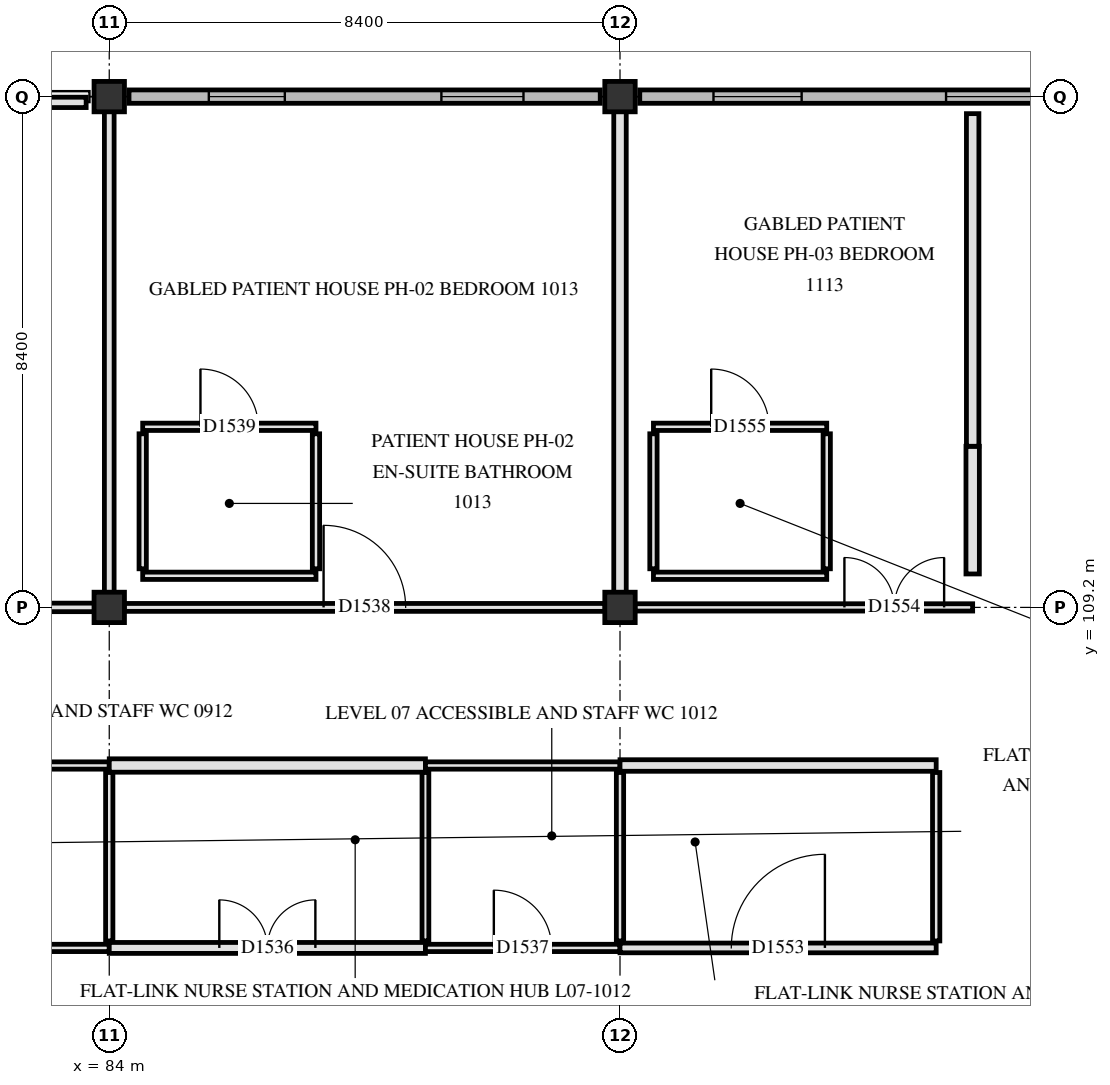
"""IFC4 building model, lengths in metres.
Left out: names, types, materials, properties, quantities, classifications, styles, units other than length and angle.
Written with IfcOpenShell. Run it as: python <this file> out.ifc"""

import sys

from ifc_helpers import new_model, si_unit, direction, frame, frame_2d, origin, origin_2d, place, context, subcontext, project, spatial, polyline, rectangle, outline, extrude, element, fill, save


model = new_model("IFC4")
c1 = context("Model", 3, precision=1e-05, world=origin(), true_north=direction((0.0, 1.0)))
c2 = subcontext(c1, "Body", "Model", "MODEL_VIEW")
j1 = project(units=[si_unit("LENGTHUNIT", "METRE"), si_unit("PLANEANGLEUNIT", "RADIAN")], contexts=[c1])
p1 = place(None, origin())
s1 = spatial("IfcSite", under=j1, at=p1, CompositionType="ELEMENT")
p2 = place(p1, origin())
s2 = spatial("IfcBuilding", under=s1, at=p2, CompositionType="ELEMENT")
p3 = place(p2, frame((0.0, 0.0, 30.3)))
s3 = spatial("IfcBuildingStorey", under=s2, at=p3, CompositionType="ELEMENT", Elevation=30.3)
for number, where, z_axis, x_axis in (
    (1, (84.0, 109.2, 0.0), (0.0, 0.0, 1.0), (1.0, 0.0, 0.0)),
    (2, (84.0, 117.6, 0.0), (0.0, 0.0, 1.0), (1.0, 0.0, 0.0)),
    (3, (92.4, 109.2, 0.0), (0.0, 0.0, 1.0), (1.0, 0.0, 0.0)),
    (4, (92.4, 117.6, 0.0), (0.0, 0.0, 1.0), (1.0, 0.0, 0.0)),
):
    element("IfcColumn", number, at=place(p3, frame(where, z_axis=z_axis, x_axis=x_axis)), inside=s3, PredefinedType="COLUMN", context=c2, shape_type="SweptSolid", body=[
        extrude(rectangle(XDim=0.5, YDim=0.5, at=origin_2d()), origin(), (0.0, 0.0, 1.0), 3.9),
    ])
p4 = place(p3, frame((84.325, 117.6, 0.0), z_axis=(0.0, 0.0, 1.0), x_axis=(1.0, 0.0, 0.0)))
e5 = element("IfcWall", 5, at=p4, inside=s3, PredefinedType="SOLIDWALL", context=c2, shape_type="SweptSolid", body=[
    extrude(outline(polyline([(0.0, 0.0), (7.75, 0.0), (7.75, 3.4), (3.875, 5.76), (0.0, 3.4), (0.0, 0.0)])), frame((0.0, 0.11, 0.0), z_axis=(0.0, -1.0, 0.0), x_axis=(1.0, 0.0, 0.0)), (0.0, 0.0, 1.0), 0.22),
])
p5 = place(p4, frame((1.312, 0.0, 0.85)))
e6 = element("IfcOpeningElement", 6, at=p5, cuts=e5, PredefinedType="OPENING", context=c2, shape_type="SweptSolid", body=[
    extrude(rectangle(XDim=1.25, YDim=1.54, at=frame_2d((0.625, 0.77))), frame((0.0, 0.12, 0.0), z_axis=(0.0, -1.0, 0.0), x_axis=(1.0, 0.0, 0.0)), (0.0, 0.0, 1.0), 0.24),
])
p6 = place(p4, frame((5.137, 0.0, 0.85)))
e7 = element("IfcOpeningElement", 7, at=p6, cuts=e5, PredefinedType="OPENING", context=c2, shape_type="SweptSolid", body=[
    extrude(rectangle(XDim=1.35, YDim=1.54, at=frame_2d((0.675, 0.77))), frame((0.0, 0.12, 0.0), z_axis=(0.0, -1.0, 0.0), x_axis=(1.0, 0.0, 0.0)), (0.0, 0.0, 1.0), 0.24),
])
p7 = place(p3, frame((92.725, 117.6, 0.0), z_axis=(0.0, 0.0, 1.0), x_axis=(1.0, 0.0, 0.0)))
e8 = element("IfcWall", 8, at=p7, inside=s3, PredefinedType="SOLIDWALL", context=c2, shape_type="SweptSolid", body=[
    extrude(outline(polyline([(0.0, 0.0), (7.75, 0.0), (7.75, 3.4), (3.875, 5.76), (0.0, 3.4), (0.0, 0.0)])), frame((0.0, 0.11, 0.0), z_axis=(0.0, -1.0, 0.0), x_axis=(1.0, 0.0, 0.0)), (0.0, 0.0, 1.0), 0.22),
])
p8 = place(p7, frame((1.212, 0.0, 0.85)))
e9 = element("IfcOpeningElement", 9, at=p8, cuts=e8, PredefinedType="OPENING", context=c2, shape_type="SweptSolid", body=[
    extrude(rectangle(XDim=1.45, YDim=1.54, at=frame_2d((0.725, 0.77))), frame((0.0, 0.12, 0.0), z_axis=(0.0, -1.0, 0.0), x_axis=(1.0, 0.0, 0.0)), (0.0, 0.0, 1.0), 0.24),
])
p9 = place(p7, frame((5.038, 0.0, 0.85)))
e10 = element("IfcOpeningElement", 10, at=p9, cuts=e8, PredefinedType="OPENING", context=c2, shape_type="SweptSolid", body=[
    extrude(rectangle(XDim=1.55, YDim=1.54, at=frame_2d((0.775, 0.77))), frame((0.0, 0.12, 0.0), z_axis=(0.0, -1.0, 0.0), x_axis=(1.0, 0.0, 0.0)), (0.0, 0.0, 1.0), 0.24),
])
p10 = place(p3, frame((75.98, 117.505, 3.88), z_axis=(0.0, 0.0, 1.0), x_axis=(1.0, 0.0, 0.0)))
e11 = element("IfcWall", 11, at=p10, inside=s3, PredefinedType="PARAPET", context=c2, shape_type="SweptSolid", body=[
    extrude(rectangle(XDim=7.64, YDim=0.17, at=frame_2d((3.82, 0.0))), origin(), (0.0, 0.0, 1.0), 0.47),
])
p11 = place(p3, frame((80.8, 103.6, 0.0), z_axis=(0.0, 0.0, 1.0), x_axis=(1.0, 0.0, 0.0)))
e12 = element("IfcWall", 12, at=p11, inside=s3, PredefinedType="PARTITIONING", context=c2, shape_type="SweptSolid", body=[
    extrude(rectangle(XDim=3.2, YDim=0.12, at=frame_2d((1.6, 0.0))), origin(), (0.0, 0.0, 1.0), 3.25),
])
p12 = place(p11, frame((1.125, 0.0, 0.0)))
e13 = element("IfcOpeningElement", 13, at=p12, cuts=e12, PredefinedType="OPENING", context=c2, shape_type="SweptSolid", body=[
    extrude(rectangle(XDim=0.95, YDim=2.1, at=frame_2d((0.475, 1.05))), frame((0.0, 0.07, 0.0), z_axis=(0.0, -1.0, 0.0), x_axis=(1.0, 0.0, 0.0)), (0.0, 0.0, 1.0), 0.14),
])
p13 = place(p3, frame((84.0, 103.6, 0.0), z_axis=(0.0, 0.0, 1.0), x_axis=(1.0, 0.0, 0.0)))
e14 = element("IfcWall", 14, at=p13, inside=s3, PredefinedType="PARTITIONING", context=c2, shape_type="SweptSolid", body=[
    extrude(rectangle(XDim=5.2, YDim=0.18, at=frame_2d((2.6, 0.0))), origin(), (0.0, 0.0, 1.0), 3.25),
])
p14 = place(p13, frame((1.81, 0.0, 0.0)))
e15 = element("IfcOpeningElement", 15, at=p14, cuts=e14, PredefinedType="OPENING", context=c2, shape_type="SweptSolid", body=[
    extrude(rectangle(XDim=1.58, YDim=2.22, at=frame_2d((0.79, 1.11))), frame((0.0, 0.1, 0.0), z_axis=(0.0, -1.0, 0.0), x_axis=(1.0, 0.0, 0.0)), (0.0, 0.0, 1.0), 0.2),
])
p15 = place(p3, frame((89.2, 103.6, 0.0), z_axis=(0.0, 0.0, 1.0), x_axis=(1.0, 0.0, 0.0)))
e16 = element("IfcWall", 16, at=p15, inside=s3, PredefinedType="PARTITIONING", context=c2, shape_type="SweptSolid", body=[
    extrude(rectangle(XDim=3.2, YDim=0.12, at=frame_2d((1.6, 0.0))), origin(), (0.0, 0.0, 1.0), 3.25),
])
p16 = place(p15, frame((1.125, 0.0, 0.0)))
e17 = element("IfcOpeningElement", 17, at=p16, cuts=e16, PredefinedType="OPENING", context=c2, shape_type="SweptSolid", body=[
    extrude(rectangle(XDim=0.95, YDim=2.1, at=frame_2d((0.475, 1.05))), frame((0.0, 0.07, 0.0), z_axis=(0.0, -1.0, 0.0), x_axis=(1.0, 0.0, 0.0)), (0.0, 0.0, 1.0), 0.14),
])
p17 = place(p3, frame((92.4, 103.6, 0.0), z_axis=(0.0, 0.0, 1.0), x_axis=(1.0, 0.0, 0.0)))
e18 = element("IfcWall", 18, at=p17, inside=s3, PredefinedType="PARTITIONING", context=c2, shape_type="SweptSolid", body=[
    extrude(rectangle(XDim=5.2, YDim=0.16, at=frame_2d((2.6, 0.0))), origin(), (0.0, 0.0, 1.0), 3.25),
])
p18 = place(p17, frame((1.83, 0.0, 0.0)))
e19 = element("IfcOpeningElement", 19, at=p18, cuts=e18, PredefinedType="OPENING", context=c2, shape_type="SweptSolid", body=[
    extrude(rectangle(XDim=1.54, YDim=2.24, at=frame_2d((0.77, 1.12))), frame((0.0, 0.09, 0.0), z_axis=(0.0, -1.0, 0.0), x_axis=(1.0, 0.0, 0.0)), (0.0, 0.0, 1.0), 0.18),
])
p19 = place(p3, frame((80.8, 106.6, 0.0), z_axis=(0.0, 0.0, 1.0), x_axis=(1.0, 0.0, 0.0)))
e20 = element("IfcWall", 20, at=p19, inside=s3, PredefinedType="PARTITIONING", context=c2, shape_type="SweptSolid", body=[
    extrude(rectangle(XDim=3.2, YDim=0.12, at=frame_2d((1.6, 0.0))), origin(), (0.0, 0.0, 1.0), 3.25),
])
p20 = place(p3, frame((84.0, 106.6, 0.0), z_axis=(0.0, 0.0, 1.0), x_axis=(1.0, 0.0, 0.0)))
e21 = element("IfcWall", 21, at=p20, inside=s3, PredefinedType="PARTITIONING", context=c2, shape_type="SweptSolid", body=[
    extrude(rectangle(XDim=5.2, YDim=0.22, at=frame_2d((2.6, 0.0))), origin(), (0.0, 0.0, 1.0), 3.25),
])
p21 = place(p3, frame((89.2, 106.6, 0.0), z_axis=(0.0, 0.0, 1.0), x_axis=(1.0, 0.0, 0.0)))
e22 = element("IfcWall", 22, at=p21, inside=s3, PredefinedType="PARTITIONING", context=c2, shape_type="SweptSolid", body=[
    extrude(rectangle(XDim=3.2, YDim=0.12, at=frame_2d((1.6, 0.0))), origin(), (0.0, 0.0, 1.0), 3.25),
])
p22 = place(p3, frame((92.4, 106.6, 0.0), z_axis=(0.0, 0.0, 1.0), x_axis=(1.0, 0.0, 0.0)))
e23 = element("IfcWall", 23, at=p22, inside=s3, PredefinedType="PARTITIONING", context=c2, shape_type="SweptSolid", body=[
    extrude(rectangle(XDim=5.2, YDim=0.19, at=frame_2d((2.6, 0.0))), origin(), (0.0, 0.0, 1.0), 3.25),
])
p23 = place(p3, frame((75.845, 109.2, 0.0), z_axis=(0.0, 0.0, 1.0), x_axis=(1.0, 0.0, 0.0)))
e24 = element("IfcWall", 24, at=p23, inside=s3, PredefinedType="PARTITIONING", context=c2, shape_type="SweptSolid", body=[
    extrude(rectangle(XDim=7.91, YDim=0.14, at=frame_2d((3.955, 0.0))), origin(), (0.0, 0.0, 1.0), 3.25),
])
p24 = place(p23, frame((3.315, 0.0, 0.0)))
e25 = element("IfcOpeningElement", 25, at=p24, cuts=e24, PredefinedType="OPENING", context=c2, shape_type="SweptSolid", body=[
    extrude(rectangle(XDim=1.28, YDim=2.18, at=frame_2d((0.64, 1.09))), frame((0.0, 0.08, 0.0), z_axis=(0.0, -1.0, 0.0), x_axis=(1.0, 0.0, 0.0)), (0.0, 0.0, 1.0), 0.16),
])
p25 = place(p3, frame((84.245, 109.2, 0.0), z_axis=(0.0, 0.0, 1.0), x_axis=(1.0, 0.0, 0.0)))
e26 = element("IfcWall", 26, at=p25, inside=s3, PredefinedType="PARTITIONING", context=c2, shape_type="SweptSolid", body=[
    extrude(rectangle(XDim=7.91, YDim=0.13, at=frame_2d((3.955, 0.0))), origin(), (0.0, 0.0, 1.0), 3.25),
])
p26 = place(p25, frame((3.28, 0.0, 0.0)))
e27 = element("IfcOpeningElement", 27, at=p26, cuts=e26, PredefinedType="OPENING", context=c2, shape_type="SweptSolid", body=[
    extrude(rectangle(XDim=1.35, YDim=2.2, at=frame_2d((0.675, 1.1))), frame((0.0, 0.075, 0.0), z_axis=(0.0, -1.0, 0.0), x_axis=(1.0, 0.0, 0.0)), (0.0, 0.0, 1.0), 0.15),
])
p27 = place(p3, frame((92.645, 109.2, 0.0), z_axis=(0.0, 0.0, 1.0), x_axis=(1.0, 0.0, 0.0)))
e28 = element("IfcWall", 28, at=p27, inside=s3, PredefinedType="PARTITIONING", context=c2, shape_type="SweptSolid", body=[
    extrude(rectangle(XDim=5.555, YDim=0.12, at=frame_2d((2.777, 0.0))), origin(), (0.0, 0.0, 1.0), 3.25),
])
p28 = place(p27, frame((3.446, 0.0, 0.0)))
e29 = element("IfcOpeningElement", 29, at=p28, cuts=e28, PredefinedType="OPENING", context=c2, shape_type="SweptSolid", body=[
    extrude(rectangle(XDim=1.64, YDim=2.28, at=frame_2d((0.82, 1.14))), frame((0.0, 0.07, 0.0), z_axis=(0.0, -1.0, 0.0), x_axis=(1.0, 0.0, 0.0)), (0.0, 0.0, 1.0), 0.14),
])
p29 = place(p3, frame((84.55, 109.72, 0.0), z_axis=(0.0, 0.0, 1.0), x_axis=(1.0, 0.0, 0.0)))
e30 = element("IfcWall", 30, at=p29, inside=s3, PredefinedType="PARTITIONING", context=c2, shape_type="SweptSolid", body=[
    extrude(rectangle(XDim=2.85, YDim=0.12, at=frame_2d((1.425, 0.0))), origin(), (0.0, 0.0, 1.0), 3.65),
])
p30 = place(p3, frame((92.95, 109.72, 0.0), z_axis=(0.0, 0.0, 1.0), x_axis=(1.0, 0.0, 0.0)))
e31 = element("IfcWall", 31, at=p30, inside=s3, PredefinedType="PARTITIONING", context=c2, shape_type="SweptSolid", body=[
    extrude(rectangle(XDim=2.85, YDim=0.12, at=frame_2d((1.425, 0.0))), origin(), (0.0, 0.0, 1.0), 3.65),
])
p31 = place(p3, frame((84.55, 112.17, 0.0), z_axis=(0.0, 0.0, 1.0), x_axis=(1.0, 0.0, 0.0)))
e32 = element("IfcWall", 32, at=p31, inside=s3, PredefinedType="PARTITIONING", context=c2, shape_type="SweptSolid", body=[
    extrude(rectangle(XDim=2.85, YDim=0.12, at=frame_2d((1.425, 0.0))), origin(), (0.0, 0.0, 1.0), 3.65),
])
p32 = place(p31, frame((0.95, 0.0, 0.0)))
e33 = element("IfcOpeningElement", 33, at=p32, cuts=e32, PredefinedType="OPENING", context=c2, shape_type="SweptSolid", body=[
    extrude(rectangle(XDim=0.95, YDim=2.1, at=frame_2d((0.475, 1.05))), frame((0.0, 0.07, 0.0), z_axis=(0.0, -1.0, 0.0), x_axis=(1.0, 0.0, 0.0)), (0.0, 0.0, 1.0), 0.14),
])
p33 = place(p3, frame((92.95, 112.17, 0.0), z_axis=(0.0, 0.0, 1.0), x_axis=(1.0, 0.0, 0.0)))
e34 = element("IfcWall", 34, at=p33, inside=s3, PredefinedType="PARTITIONING", context=c2, shape_type="SweptSolid", body=[
    extrude(rectangle(XDim=2.85, YDim=0.12, at=frame_2d((1.425, 0.0))), origin(), (0.0, 0.0, 1.0), 3.65),
])
p34 = place(p33, frame((0.95, 0.0, 0.0)))
e35 = element("IfcOpeningElement", 35, at=p34, cuts=e34, PredefinedType="OPENING", context=c2, shape_type="SweptSolid", body=[
    extrude(rectangle(XDim=0.95, YDim=2.1, at=frame_2d((0.475, 1.05))), frame((0.0, 0.07, 0.0), z_axis=(0.0, -1.0, 0.0), x_axis=(1.0, 0.0, 0.0)), (0.0, 0.0, 1.0), 0.14),
])
p35 = place(p3, frame((84.0, 103.715, 0.0), z_axis=(0.0, 0.0, 1.0), x_axis=(0.0, 1.0, 0.0)))
e36 = element("IfcWall", 36, at=p35, inside=s3, PredefinedType="PARTITIONING", context=c2, shape_type="SweptSolid", body=[
    extrude(rectangle(XDim=2.77, YDim=0.12, at=frame_2d((1.385, 0.0))), origin(), (0.0, 0.0, 1.0), 3.25),
])
p36 = place(p3, frame((84.0, 109.445, 0.0), z_axis=(0.0, 0.0, 1.0), x_axis=(0.0, 1.0, 0.0)))
e37 = element("IfcWall", 37, at=p36, inside=s3, PredefinedType="PARTITIONING", context=c2, shape_type="SweptSolid", body=[
    extrude(rectangle(XDim=7.91, YDim=0.16, at=frame_2d((3.955, 0.0))), origin(), (0.0, 0.0, 1.0), 3.25),
])
for number, where, z_axis, x_axis in (
    (38, (84.55, 109.835, 0.0), (0.0, 0.0, 1.0), (0.0, 1.0, 0.0)),
    (39, (87.4, 109.835, 0.0), (0.0, 0.0, 1.0), (0.0, 1.0, 0.0)),
):
    element("IfcWall", number, at=place(p3, frame(where, z_axis=z_axis, x_axis=x_axis)), inside=s3, PredefinedType="PARTITIONING", context=c2, shape_type="SweptSolid", body=[
        extrude(rectangle(XDim=2.22, YDim=0.12, at=frame_2d((1.11, 0.0))), origin(), (0.0, 0.0, 1.0), 3.41),
    ])
p37 = place(p3, frame((89.2, 103.715, 0.0), z_axis=(0.0, 0.0, 1.0), x_axis=(0.0, 1.0, 0.0)))
e40 = element("IfcWall", 40, at=p37, inside=s3, PredefinedType="PARTITIONING", context=c2, shape_type="SweptSolid", body=[
    extrude(rectangle(XDim=2.77, YDim=0.112, at=frame_2d((1.385, 0.0))), origin(), (0.0, 0.0, 1.0), 3.41),
])
p38 = place(p3, frame((92.4, 103.715, 0.0), z_axis=(0.0, 0.0, 1.0), x_axis=(0.0, 1.0, 0.0)))
e41 = element("IfcWall", 41, at=p38, inside=s3, PredefinedType="PARTITIONING", context=c2, shape_type="SweptSolid", body=[
    extrude(rectangle(XDim=2.77, YDim=0.12, at=frame_2d((1.385, 0.0))), origin(), (0.0, 0.0, 1.0), 3.25),
])
p39 = place(p3, frame((92.4, 109.445, 0.0), z_axis=(0.0, 0.0, 1.0), x_axis=(0.0, 1.0, 0.0)))
e42 = element("IfcWall", 42, at=p39, inside=s3, PredefinedType="PARTITIONING", context=c2, shape_type="SweptSolid", body=[
    extrude(rectangle(XDim=7.91, YDim=0.205, at=frame_2d((3.955, 0.0))), origin(), (0.0, 0.0, 1.0), 3.25),
])
for number, where, z_axis, x_axis in (
    (43, (92.95, 109.835, 0.0), (0.0, 0.0, 1.0), (0.0, 1.0, 0.0)),
    (44, (95.8, 109.835, 0.0), (0.0, 0.0, 1.0), (0.0, 1.0, 0.0)),
):
    element("IfcWall", number, at=place(p3, frame(where, z_axis=z_axis, x_axis=x_axis)), inside=s3, PredefinedType="PARTITIONING", context=c2, shape_type="SweptSolid", body=[
        extrude(rectangle(XDim=2.22, YDim=0.12, at=frame_2d((1.11, 0.0))), origin(), (0.0, 0.0, 1.0), 3.41),
    ])
p40 = place(p3, frame((97.6, 103.715, 0.0), z_axis=(0.0, 0.0, 1.0), x_axis=(0.0, 1.0, 0.0)))
e45 = element("IfcWall", 45, at=p40, inside=s3, PredefinedType="PARTITIONING", context=c2, shape_type="SweptSolid", body=[
    extrude(rectangle(XDim=2.77, YDim=0.12, at=frame_2d((1.385, 0.0))), origin(), (0.0, 0.0, 1.0), 3.41),
])
p41 = place(p3, frame((98.2, 109.75, 0.0), z_axis=(0.0, 0.0, 1.0), x_axis=(0.0, 1.0, 0.0)))
e46 = element("IfcWall", 46, at=p41, inside=s3, PredefinedType="PARTITIONING", context=c2, shape_type="SweptSolid", body=[
    extrude(rectangle(XDim=2.1, YDim=0.22, at=frame_2d((1.05, 0.0))), origin(), (0.0, 0.0, 1.0), 3.65),
])
p42 = place(p3, frame((98.2, 111.85, 0.0), z_axis=(0.0, 0.0, 1.0), x_axis=(0.0, 1.0, 0.0)))
e47 = element("IfcWall", 47, at=p42, inside=s3, PredefinedType="PARTITIONING", context=c2, shape_type="SweptSolid", body=[
    extrude(rectangle(XDim=5.47, YDim=0.205, at=frame_2d((2.735, 0.0))), origin(), (0.0, 0.0, 1.0), 3.41),
])
p43 = place(p5, origin())
e48 = element("IfcWindow", 48, at=p43, inside=s3, PartitioningType="SINGLE_PANEL", PredefinedType="WINDOW", context=c2, shape_type="SweptSolid", body=[
    extrude(rectangle(XDim=1.25, YDim=1.54, at=frame_2d((0.625, 0.77))), frame((0.0, 0.03, 0.0), z_axis=(0.0, -1.0, 0.0), x_axis=(1.0, 0.0, 0.0)), (0.0, 0.0, 1.0), 0.06),
])
fill(e6, e48)
p44 = place(p6, origin())
e49 = element("IfcWindow", 49, at=p44, inside=s3, PartitioningType="SINGLE_PANEL", PredefinedType="WINDOW", context=c2, shape_type="SweptSolid", body=[
    extrude(rectangle(XDim=1.35, YDim=1.54, at=frame_2d((0.675, 0.77))), frame((0.0, 0.03, 0.0), z_axis=(0.0, -1.0, 0.0), x_axis=(1.0, 0.0, 0.0)), (0.0, 0.0, 1.0), 0.06),
])
fill(e7, e49)
p45 = place(p8, origin())
e50 = element("IfcWindow", 50, at=p45, inside=s3, PartitioningType="SINGLE_PANEL", PredefinedType="WINDOW", context=c2, shape_type="SweptSolid", body=[
    extrude(rectangle(XDim=1.45, YDim=1.54, at=frame_2d((0.725, 0.77))), frame((0.0, 0.03, 0.0), z_axis=(0.0, -1.0, 0.0), x_axis=(1.0, 0.0, 0.0)), (0.0, 0.0, 1.0), 0.06),
])
fill(e9, e50)
p46 = place(p9, origin())
e51 = element("IfcWindow", 51, at=p46, inside=s3, PartitioningType="SINGLE_PANEL", PredefinedType="WINDOW", context=c2, shape_type="SweptSolid", body=[
    extrude(rectangle(XDim=1.55, YDim=1.54, at=frame_2d((0.775, 0.77))), frame((0.0, 0.03, 0.0), z_axis=(0.0, -1.0, 0.0), x_axis=(1.0, 0.0, 0.0)), (0.0, 0.0, 1.0), 0.06),
])
fill(e10, e51)
p47 = place(p14, origin())
e52 = element("IfcDoor", 52, at=p47, inside=s3, OperationType="DOUBLE_SWING_LEFT", PredefinedType="DOOR", context=c2, shape_type="SweptSolid", body=[
    extrude(rectangle(XDim=1.58, YDim=2.22, at=frame_2d((0.79, 1.11))), frame((0.0, 0.025, 0.0), z_axis=(0.0, -1.0, 0.0), x_axis=(1.0, 0.0, 0.0)), (0.0, 0.0, 1.0), 0.05),
])
fill(e15, e52)
p48 = place(p16, origin())
e53 = element("IfcDoor", 53, at=p48, inside=s3, OperationType="SINGLE_SWING_LEFT", PredefinedType="DOOR", context=c2, shape_type="SweptSolid", body=[
    extrude(rectangle(XDim=0.95, YDim=2.1, at=frame_2d((0.475, 1.05))), frame((0.0, 0.025, 0.0), z_axis=(0.0, -1.0, 0.0), x_axis=(1.0, 0.0, 0.0)), (0.0, 0.0, 1.0), 0.05),
])
fill(e17, e53)
p49 = place(p26, origin())
e54 = element("IfcDoor", 54, at=p49, inside=s3, OperationType="SINGLE_SWING_LEFT", PredefinedType="DOOR", context=c2, shape_type="SweptSolid", body=[
    extrude(rectangle(XDim=1.35, YDim=2.2, at=frame_2d((0.675, 1.1))), frame((0.0, 0.025, 0.0), z_axis=(0.0, -1.0, 0.0), x_axis=(1.0, 0.0, 0.0)), (0.0, 0.0, 1.0), 0.05),
])
fill(e27, e54)
p50 = place(p32, origin())
e55 = element("IfcDoor", 55, at=p50, inside=s3, OperationType="SINGLE_SWING_LEFT", PredefinedType="DOOR", context=c2, shape_type="SweptSolid", body=[
    extrude(rectangle(XDim=0.95, YDim=2.1, at=frame_2d((0.475, 1.05))), frame((0.0, 0.025, 0.0), z_axis=(0.0, -1.0, 0.0), x_axis=(1.0, 0.0, 0.0)), (0.0, 0.0, 1.0), 0.05),
])
fill(e33, e55)
p51 = place(p18, origin())
e56 = element("IfcDoor", 56, at=p51, inside=s3, OperationType="SINGLE_SWING_RIGHT", PredefinedType="DOOR", context=c2, shape_type="SweptSolid", body=[
    extrude(rectangle(XDim=1.54, YDim=2.24, at=frame_2d((0.77, 1.12))), frame((0.0, 0.025, 0.0), z_axis=(0.0, -1.0, 0.0), x_axis=(1.0, 0.0, 0.0)), (0.0, 0.0, 1.0), 0.05),
])
fill(e19, e56)
p52 = place(p28, origin())
e57 = element("IfcDoor", 57, at=p52, inside=s3, OperationType="DOUBLE_SWING_LEFT", PredefinedType="DOOR", context=c2, shape_type="SweptSolid", body=[
    extrude(rectangle(XDim=1.64, YDim=2.28, at=frame_2d((0.82, 1.14))), frame((0.0, 0.025, 0.0), z_axis=(0.0, -1.0, 0.0), x_axis=(1.0, 0.0, 0.0)), (0.0, 0.0, 1.0), 0.05),
])
fill(e29, e57)
p53 = place(p34, origin())
e58 = element("IfcDoor", 58, at=p53, inside=s3, OperationType="SINGLE_SWING_LEFT", PredefinedType="DOOR", context=c2, shape_type="SweptSolid", body=[
    extrude(rectangle(XDim=0.95, YDim=2.1, at=frame_2d((0.475, 1.05))), frame((0.0, 0.025, 0.0), z_axis=(0.0, -1.0, 0.0), x_axis=(1.0, 0.0, 0.0)), (0.0, 0.0, 1.0), 0.05),
])
fill(e35, e58)
save(model, sys.argv[1])
